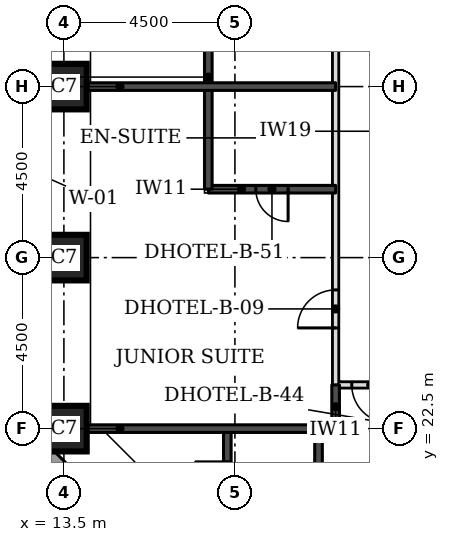
"""IFC4 building model, lengths in metres.
Left out: names, types, materials, properties, quantities, classifications, styles, units other than length and angle.
Written with IfcOpenShell. Run it as: python <this file> out.ifc"""

import sys

from ifc_helpers import new_model, si_unit, direction, frame, frame_2d, origin, origin_2d, place, context, subcontext, project, spatial, rectangle, extrude, element, fill, save


model = new_model("IFC4")
c1 = context("Model", 3, precision=1e-05, world=origin(), true_north=direction((0.0, 1.0)))
c2 = subcontext(c1, "Body", "Model", "MODEL_VIEW")
j1 = project(units=[si_unit("LENGTHUNIT", "METRE"), si_unit("PLANEANGLEUNIT", "RADIAN")], contexts=[c1])
p1 = place(None, origin())
s1 = spatial("IfcSite", under=j1, at=p1, CompositionType="ELEMENT")
p2 = place(p1, origin())
s2 = spatial("IfcBuilding", under=s1, at=p2, CompositionType="ELEMENT")
p3 = place(p2, frame((0.0, 0.0, 52.8)))
s3 = spatial("IfcBuildingStorey", under=s2, at=p3, CompositionType="ELEMENT", Elevation=52.8)
for number, where, z_axis, x_axis in (
    (1, (13.5, 22.5, 0.0), (0.0, 0.0, 1.0), (1.0, 0.0, 0.0)),
    (2, (13.5, 27.0, 0.0), (0.0, 0.0, 1.0), (1.0, 0.0, 0.0)),
    (3, (13.5, 31.5, 0.0), (0.0, 0.0, 1.0), (1.0, 0.0, 0.0)),
):
    element("IfcColumn", number, at=place(p3, frame(where, z_axis=z_axis, x_axis=x_axis)), inside=s3, PredefinedType="COLUMN", context=c2, shape_type="SweptSolid", body=[
        extrude(rectangle(XDim=1.2, YDim=1.2, at=origin_2d()), origin(), (0.0, 0.0, 1.0), 3.3),
    ])
p4 = place(p3, frame((12.674, 22.23, 0.0), z_axis=(0.0, 0.0, 1.0), x_axis=(0.707106781187, -0.707106781187, 0.0)))
e4 = element("IfcWall", 4, at=p4, inside=s3, PredefinedType="STANDARD", context=c2, shape_type="SweptSolid", body=[
    extrude(rectangle(XDim=7.151, YDim=0.35, at=frame_2d((3.576, 0.0))), origin(), (0.0, 0.0, 1.0), 3.055),
])
p5 = place(p4, frame((1.926, 0.0, 0.8)))
e5 = element("IfcOpeningElement", 5, at=p5, cuts=e4, PredefinedType="OPENING", context=c2, shape_type="SweptSolid", body=[
    extrude(rectangle(XDim=3.3, YDim=1.5, at=frame_2d((1.65, 0.75))), frame((0.0, 0.185, 0.0), z_axis=(0.0, -1.0, 0.0), x_axis=(1.0, 0.0, 0.0)), (0.0, 0.0, 1.0), 0.37),
])
p6 = place(p3, frame((20.65, 23.65, 0.0), z_axis=(0.0, 0.0, 1.0), x_axis=(1.0, 0.0, 0.0)))
e6 = element("IfcWall", 6, at=p6, inside=s3, PredefinedType="PARTITIONING", context=c2, shape_type="SweptSolid", body=[
    extrude(rectangle(XDim=32.2, YDim=0.15, at=frame_2d((16.1, 0.0))), origin(), (0.0, 0.0, 1.0), 3.08),
])
p7 = place(p6, frame((2.55, 0.0, 0.0)))
e7 = element("IfcOpeningElement", 7, at=p7, cuts=e6, PredefinedType="OPENING", context=c2, shape_type="SweptSolid", body=[
    extrude(rectangle(XDim=1.0, YDim=2.1, at=frame_2d((0.5, 1.05))), frame((0.0, 0.085, 0.0), z_axis=(0.0, -1.0, 0.0), x_axis=(1.0, 0.0, 0.0)), (0.0, 0.0, 1.0), 0.17),
])
p8 = place(p6, frame((9.4, 0.0, 0.0)))
e8 = element("IfcOpeningElement", 8, at=p8, cuts=e6, PredefinedType="OPENING", context=c2, shape_type="SweptSolid", body=[
    extrude(rectangle(XDim=1.0, YDim=2.1, at=frame_2d((0.5, 1.05))), frame((0.0, 0.085, 0.0), z_axis=(0.0, -1.0, 0.0), x_axis=(1.0, 0.0, 0.0)), (0.0, 0.0, 1.0), 0.17),
])
p9 = place(p6, frame((11.55, 0.0, 0.0)))
e9 = element("IfcOpeningElement", 9, at=p9, cuts=e6, PredefinedType="OPENING", context=c2, shape_type="SweptSolid", body=[
    extrude(rectangle(XDim=1.0, YDim=2.1, at=frame_2d((0.5, 1.05))), frame((0.0, 0.085, 0.0), z_axis=(0.0, -1.0, 0.0), x_axis=(1.0, 0.0, 0.0)), (0.0, 0.0, 1.0), 0.17),
])
p10 = place(p6, frame((18.4, 0.0, 0.0)))
e10 = element("IfcOpeningElement", 10, at=p10, cuts=e6, PredefinedType="OPENING", context=c2, shape_type="SweptSolid", body=[
    extrude(rectangle(XDim=1.0, YDim=2.1, at=frame_2d((0.5, 1.05))), frame((0.0, 0.085, 0.0), z_axis=(0.0, -1.0, 0.0), x_axis=(1.0, 0.0, 0.0)), (0.0, 0.0, 1.0), 0.17),
])
p11 = place(p6, frame((20.55, 0.0, 0.0)))
e11 = element("IfcOpeningElement", 11, at=p11, cuts=e6, PredefinedType="OPENING", context=c2, shape_type="SweptSolid", body=[
    extrude(rectangle(XDim=1.0, YDim=2.1, at=frame_2d((0.5, 1.05))), frame((0.0, 0.085, 0.0), z_axis=(0.0, -1.0, 0.0), x_axis=(1.0, 0.0, 0.0)), (0.0, 0.0, 1.0), 0.17),
])
p12 = place(p6, frame((27.4, 0.0, 0.0)))
e12 = element("IfcOpeningElement", 12, at=p12, cuts=e6, PredefinedType="OPENING", context=c2, shape_type="SweptSolid", body=[
    extrude(rectangle(XDim=1.0, YDim=2.1, at=frame_2d((0.5, 1.05))), frame((0.0, 0.085, 0.0), z_axis=(0.0, -1.0, 0.0), x_axis=(1.0, 0.0, 0.0)), (0.0, 0.0, 1.0), 0.17),
])
p13 = place(p6, frame((0.425, 0.0, 0.0)))
e13 = element("IfcOpeningElement", 13, at=p13, cuts=e6, PredefinedType="OPENING", context=c2, shape_type="SweptSolid", body=[
    extrude(rectangle(XDim=1.0, YDim=2.1, at=frame_2d((0.5, 1.05))), frame((0.0, 0.085, 0.0), z_axis=(0.0, -1.0, 0.0), x_axis=(1.0, 0.0, 0.0)), (0.0, 0.0, 1.0), 0.17),
])
p14 = place(p6, frame((30.025, 0.0, 0.0)))
e14 = element("IfcOpeningElement", 14, at=p14, cuts=e6, PredefinedType="OPENING", context=c2, shape_type="SweptSolid", body=[
    extrude(rectangle(XDim=1.0, YDim=2.1, at=frame_2d((0.5, 1.05))), frame((0.0, 0.085, 0.0), z_axis=(0.0, -1.0, 0.0), x_axis=(1.0, 0.0, 0.0)), (0.0, 0.0, 1.0), 0.17),
])
p15 = place(p3, frame((20.65, 23.65, 0.0), z_axis=(0.0, 0.0, 1.0), x_axis=(0.0, 1.0, 0.0)))
e15 = element("IfcWall", 15, at=p15, inside=s3, PredefinedType="PARTITIONING", context=c2, shape_type="SweptSolid", body=[
    extrude(rectangle(XDim=25.85, YDim=0.15, at=frame_2d((12.925, 0.0))), origin(), (0.0, 0.0, 1.0), 3.08),
])
p16 = place(p15, frame((1.5, 0.0, 0.0)))
e16 = element("IfcOpeningElement", 16, at=p16, cuts=e15, PredefinedType="OPENING", context=c2, shape_type="SweptSolid", body=[
    extrude(rectangle(XDim=1.0, YDim=2.1, at=frame_2d((0.5, 1.05))), frame((0.0, 0.085, 0.0), z_axis=(0.0, -1.0, 0.0), x_axis=(1.0, 0.0, 0.0)), (0.0, 0.0, 1.0), 0.17),
])
p17 = place(p15, frame((13.45, 0.0, 0.0)))
e17 = element("IfcOpeningElement", 17, at=p17, cuts=e15, PredefinedType="OPENING", context=c2, shape_type="SweptSolid", body=[
    extrude(rectangle(XDim=1.0, YDim=2.1, at=frame_2d((0.5, 1.05))), frame((0.0, 0.085, 0.0), z_axis=(0.0, -1.0, 0.0), x_axis=(1.0, 0.0, 0.0)), (0.0, 0.0, 1.0), 0.17),
])
p18 = place(p15, frame((19.5, 0.0, 0.0)))
e18 = element("IfcOpeningElement", 18, at=p18, cuts=e15, PredefinedType="OPENING", context=c2, shape_type="SweptSolid", body=[
    extrude(rectangle(XDim=1.0, YDim=2.1, at=frame_2d((0.5, 1.05))), frame((0.0, 0.085, 0.0), z_axis=(0.0, -1.0, 0.0), x_axis=(1.0, 0.0, 0.0)), (0.0, 0.0, 1.0), 0.17),
])
p19 = place(p3, frame((17.8, 20.0, 0.0), z_axis=(0.0, 0.0, 1.0), x_axis=(0.0, 1.0, 0.0)))
e19 = element("IfcWall", 19, at=p19, inside=s3, PredefinedType="SOLIDWALL", context=c2, shape_type="SweptSolid", body=[
    extrude(rectangle(XDim=2.5, YDim=0.2, at=frame_2d((1.25, 0.0))), origin(), (0.0, 0.0, 1.0), 3.08),
])
p20 = place(p19, frame((0.775, 0.0, 0.0)))
e20 = element("IfcOpeningElement", 20, at=p20, cuts=e19, PredefinedType="OPENING", context=c2, shape_type="SweptSolid", body=[
    extrude(rectangle(XDim=0.85, YDim=2.1, at=frame_2d((0.425, 1.05))), frame((0.0, 0.11, 0.0), z_axis=(0.0, -1.0, 0.0), x_axis=(1.0, 0.0, 0.0)), (0.0, 0.0, 1.0), 0.22),
])
p21 = place(p3, frame((20.2, 20.0, 0.0), z_axis=(0.0, 0.0, 1.0), x_axis=(0.0, 1.0, 0.0)))
e21 = element("IfcWall", 21, at=p21, inside=s3, PredefinedType="SOLIDWALL", context=c2, shape_type="SweptSolid", body=[
    extrude(rectangle(XDim=2.5, YDim=0.2, at=frame_2d((1.25, 0.0))), origin(), (0.0, 0.0, 1.0), 3.08),
])
p22 = place(p3, frame((14.1, 22.5, 0.0), z_axis=(0.0, 0.0, 1.0), x_axis=(1.0, 0.0, 0.0)))
e22 = element("IfcWall", 22, at=p22, inside=s3, PredefinedType="SOLIDWALL", context=c2, shape_type="SweptSolid", body=[
    extrude(rectangle(XDim=6.55, YDim=0.2, at=frame_2d((3.275, 0.0))), origin(), (0.0, 0.0, 1.0), 3.08),
])
p23 = place(p3, frame((20.65, 22.5, 0.0), z_axis=(0.0, 0.0, 1.0), x_axis=(0.0, 1.0, 0.0)))
e23 = element("IfcWall", 23, at=p23, inside=s3, PredefinedType="SOLIDWALL", context=c2, shape_type="SweptSolid", body=[
    extrude(rectangle(XDim=1.15, YDim=0.2, at=frame_2d((0.575, 0.0))), origin(), (0.0, 0.0, 1.0), 3.08),
])
p24 = place(p3, frame((17.3, 28.8, 0.0), z_axis=(0.0, 0.0, 1.0), x_axis=(1.0, 0.0, 0.0)))
e24 = element("IfcWall", 24, at=p24, inside=s3, PredefinedType="SOLIDWALL", context=c2, shape_type="SweptSolid", body=[
    extrude(rectangle(XDim=3.35, YDim=0.2, at=frame_2d((1.675, 0.0))), origin(), (0.0, 0.0, 1.0), 3.08),
])
p25 = place(p24, frame((1.25, 0.0, 0.0)))
e25 = element("IfcOpeningElement", 25, at=p25, cuts=e24, PredefinedType="OPENING", context=c2, shape_type="SweptSolid", body=[
    extrude(rectangle(XDim=0.85, YDim=2.1, at=frame_2d((0.425, 1.05))), frame((0.0, 0.11, 0.0), z_axis=(0.0, -1.0, 0.0), x_axis=(1.0, 0.0, 0.0)), (0.0, 0.0, 1.0), 0.22),
])
p26 = place(p3, frame((17.3, 28.8, 0.0), z_axis=(0.0, 0.0, 1.0), x_axis=(0.0, 1.0, 0.0)))
e26 = element("IfcWall", 26, at=p26, inside=s3, PredefinedType="SOLIDWALL", context=c2, shape_type="SweptSolid", body=[
    extrude(rectangle(XDim=5.9, YDim=0.2, at=frame_2d((2.95, 0.0))), origin(), (0.0, 0.0, 1.0), 3.08),
])
p27 = place(p3, frame((14.1, 31.5, 0.0), z_axis=(0.0, 0.0, 1.0), x_axis=(1.0, 0.0, 0.0)))
e27 = element("IfcWall", 27, at=p27, inside=s3, PredefinedType="SOLIDWALL", context=c2, shape_type="SweptSolid", body=[
    extrude(rectangle(XDim=6.55, YDim=0.2, at=frame_2d((3.275, 0.0))), origin(), (0.0, 0.0, 1.0), 3.08),
])
p28 = place(p16, origin())
e28 = element("IfcDoor", 28, at=p28, inside=s3, OperationType="SINGLE_SWING_LEFT", PredefinedType="DOOR", context=c2, shape_type="SweptSolid", body=[
    extrude(rectangle(XDim=1.0, YDim=2.1, at=frame_2d((0.5, 1.05))), frame((0.0, 0.025, 0.0), z_axis=(0.0, -1.0, 0.0), x_axis=(1.0, 0.0, 0.0)), (0.0, 0.0, 1.0), 0.05),
])
fill(e16, e28)
p29 = place(p25, frame((0.85, 0.0, 0.0), z_axis=(0.0, 0.0, 1.0), x_axis=(-1.0, 0.0, 0.0)))
e29 = element("IfcDoor", 29, at=p29, inside=s3, OperationType="SINGLE_SWING_LEFT", PredefinedType="DOOR", context=c2, shape_type="SweptSolid", body=[
    extrude(rectangle(XDim=0.85, YDim=2.1, at=frame_2d((0.425, 1.05))), frame((0.0, 0.025, 0.0), z_axis=(0.0, -1.0, 0.0), x_axis=(1.0, 0.0, 0.0)), (0.0, 0.0, 1.0), 0.05),
])
fill(e25, e29)
p30 = place(p13, frame((1.0, 0.0, 0.0), z_axis=(0.0, 0.0, 1.0), x_axis=(-1.0, 0.0, 0.0)))
e30 = element("IfcDoor", 30, at=p30, inside=s3, OperationType="SINGLE_SWING_LEFT", PredefinedType="DOOR", context=c2, shape_type="SweptSolid", body=[
    extrude(rectangle(XDim=1.0, YDim=2.1, at=frame_2d((0.5, 1.05))), frame((0.0, 0.025, 0.0), z_axis=(0.0, -1.0, 0.0), x_axis=(1.0, 0.0, 0.0)), (0.0, 0.0, 1.0), 0.05),
])
fill(e13, e30)
p31 = place(p20, origin())
e31 = element("IfcDoor", 31, at=p31, inside=s3, OperationType="SINGLE_SWING_RIGHT", PredefinedType="DOOR", context=c2, shape_type="SweptSolid", body=[
    extrude(rectangle(XDim=0.85, YDim=2.1, at=frame_2d((0.425, 1.05))), frame((0.0, 0.025, 0.0), z_axis=(0.0, -1.0, 0.0), x_axis=(1.0, 0.0, 0.0)), (0.0, 0.0, 1.0), 0.05),
])
fill(e20, e31)
save(model, sys.argv[1])
